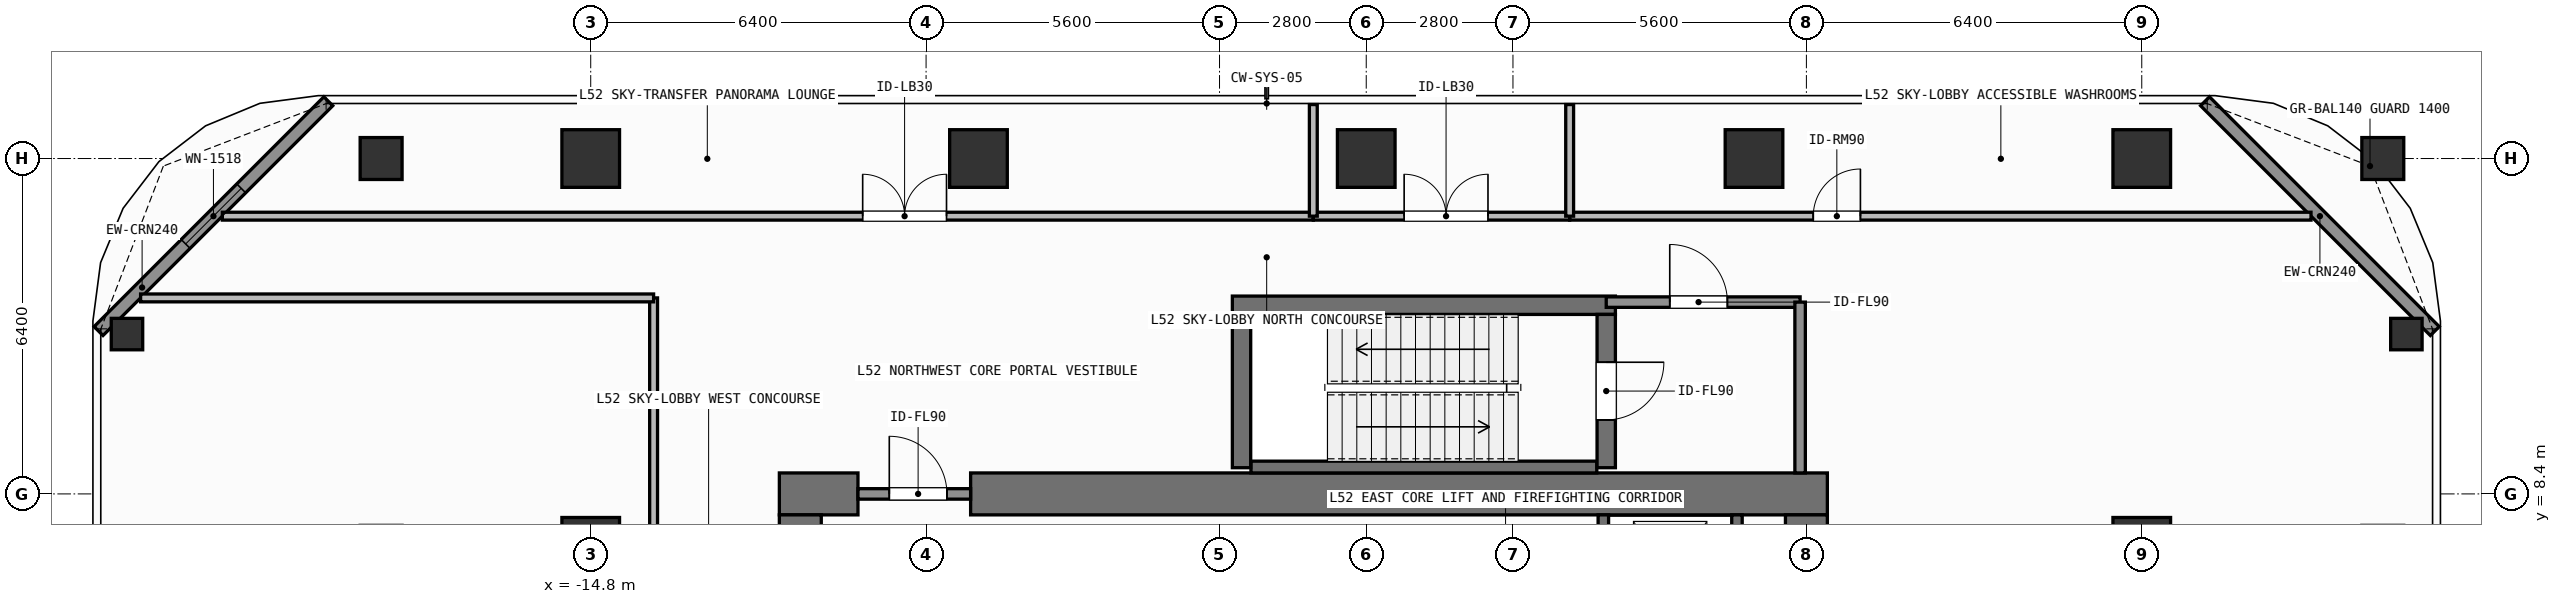
"""IFC4 building model, lengths in metres.
Left out: names, types, materials, properties, quantities, classifications, styles, units other than length and angle.
Written with IfcOpenShell. Run it as: python <this file> out.ifc"""

import sys

from ifc_helpers import new_model, si_unit, direction, frame, frame_2d, origin, origin_2d, place, context, subcontext, project, spatial, rectangle, hollow_rectangle, extrude, element, fill, save


model = new_model("IFC4")
c1 = context("Model", 3, precision=1e-05, world=origin(), true_north=direction((0.0, 1.0)))
c2 = subcontext(c1, "Body", "Model", "MODEL_VIEW")
j1 = project(units=[si_unit("LENGTHUNIT", "METRE"), si_unit("PLANEANGLEUNIT", "RADIAN")], contexts=[c1])
p1 = place(None, origin())
s1 = spatial("IfcSite", under=j1, at=p1, CompositionType="ELEMENT")
p2 = place(p1, origin())
s2 = spatial("IfcBuilding", under=s1, at=p2, CompositionType="ELEMENT")
p3 = place(p2, frame((0.0, 0.0, 210.9)))
s3 = spatial("IfcBuildingStorey", under=s2, at=p3, CompositionType="ELEMENT", Elevation=210.9)
p4 = place(p3, frame((-11.2, 8.4, 0.0), z_axis=(0.0, 0.0, 1.0), x_axis=(1.0, 0.0, 0.0)))
e1 = element("IfcWall", 1, at=p4, inside=s3, PredefinedType="SHEAR", context=c2, shape_type="SweptSolid", body=[
    extrude(rectangle(XDim=1.5, YDim=0.8, at=frame_2d((0.75, 0.0))), origin(), (0.0, 0.0, 1.0), 4.8),
])
p5 = place(p3, frame((-7.55, 8.4, 0.0), z_axis=(0.0, 0.0, 1.0), x_axis=(1.0, 0.0, 0.0)))
e2 = element("IfcWall", 2, at=p5, inside=s3, PredefinedType="SHEAR", context=c2, shape_type="SweptSolid", body=[
    extrude(rectangle(XDim=16.35, YDim=0.8, at=frame_2d((8.175, 0.0))), origin(), (0.0, 0.0, 1.0), 4.8),
])
p6 = place(p3, frame((-10.8, -8.0, 0.0), z_axis=(0.0, 0.0, 1.0), x_axis=(0.0, 1.0, 0.0)))
e3 = element("IfcWall", 3, at=p6, inside=s3, PredefinedType="SHEAR", context=c2, shape_type="SweptSolid", body=[
    extrude(rectangle(XDim=16.0, YDim=0.8, at=frame_2d((8.0, 0.0))), origin(), (0.0, 0.0, 1.0), 4.8),
])
p7 = place(p3, frame((8.4, 5.825, 0.0), z_axis=(0.0, 0.0, 1.0), x_axis=(0.0, 1.0, 0.0)))
e4 = element("IfcWall", 4, at=p7, inside=s3, PredefinedType="SHEAR", context=c2, shape_type="SweptSolid", body=[
    extrude(rectangle(XDim=2.175, YDim=0.8, at=frame_2d((1.087, 0.0))), origin(), (0.0, 0.0, 1.0), 4.8),
])
p8 = place(p3, frame((-2.555, 12.0, 0.0), z_axis=(0.0, 0.0, 1.0), x_axis=(1.0, 0.0, 0.0)))
e5 = element("IfcWall", 5, at=p8, inside=s3, PredefinedType="SHEAR", context=c2, shape_type="SweptSolid", body=[
    extrude(rectangle(XDim=7.31, YDim=0.35, at=frame_2d((3.655, 0.0))), origin(), (0.0, 0.0, 1.0), 4.8),
])
p9 = place(p3, frame((-2.2, 8.913, 0.0), z_axis=(0.0, 0.0, 1.0), x_axis=(1.0, 0.0, 0.0)))
e6 = element("IfcWall", 6, at=p9, inside=s3, PredefinedType="SHEAR", context=c2, shape_type="SweptSolid", body=[
    extrude(rectangle(XDim=6.6, YDim=0.225, at=frame_2d((3.3, 0.0))), origin(), (0.0, 0.0, 1.0), 4.8),
])
p10 = place(p3, frame((-2.38, 8.9, 0.0), z_axis=(0.0, 0.0, 1.0), x_axis=(0.0, 1.0, 0.0)))
e7 = element("IfcWall", 7, at=p10, inside=s3, PredefinedType="SHEAR", context=c2, shape_type="SweptSolid", body=[
    extrude(rectangle(XDim=2.925, YDim=0.35, at=frame_2d((1.462, 0.0))), origin(), (0.0, 0.0, 1.0), 4.8),
])
p11 = place(p3, frame((4.58, 11.825, 0.0), z_axis=(0.0, 0.0, 1.0), x_axis=(0.0, -1.0, 0.0)))
e8 = element("IfcWall", 8, at=p11, inside=s3, PredefinedType="SHEAR", context=c2, shape_type="SweptSolid", body=[
    extrude(rectangle(XDim=2.925, YDim=0.35, at=frame_2d((1.462, 0.0))), origin(), (0.0, 0.0, 1.0), 4.8),
])
p12 = place(p11, frame((0.913, 0.0, 0.0)))
e9 = element("IfcOpeningElement", 9, at=p12, cuts=e8, PredefinedType="OPENING", context=c2, shape_type="SweptSolid", body=[
    extrude(rectangle(XDim=1.1, YDim=2.15, at=frame_2d((0.55, 1.075))), frame((0.0, 0.185, 0.0), z_axis=(0.0, -1.0, 0.0), x_axis=(1.0, 0.0, 0.0)), (0.0, 0.0, 1.0), 0.37),
])
for number, where, z_axis, x_axis in (
    (10, (-14.8, 14.8, 0.0), (0.0, 0.0, 1.0), (1.0, 0.0, 0.0)),
    (11, (-7.4, 14.8, 0.0), (0.0, 0.0, 1.0), (1.0, 0.0, 0.0)),
    (12, (0.0, 14.8, 0.0), (0.0, 0.0, 1.0), (1.0, 0.0, 0.0)),
    (13, (7.4, 14.8, 0.0), (0.0, 0.0, 1.0), (1.0, 0.0, 0.0)),
    (14, (14.8, 14.8, 0.0), (0.0, 0.0, 1.0), (1.0, 0.0, 0.0)),
    (15, (-14.8, 7.4, 0.0), (0.0, 0.0, 1.0), (1.0, 0.0, 0.0)),
    (16, (14.8, 7.4, 0.0), (0.0, 0.0, 1.0), (1.0, 0.0, 0.0)),
):
    element("IfcColumn", number, at=place(p3, frame(where, z_axis=z_axis, x_axis=x_axis)), inside=s3, PredefinedType="COLUMN", context=c2, shape_type="SweptSolid", body=[
        extrude(rectangle(XDim=1.1, YDim=1.1, at=origin_2d()), origin(), (0.0, 0.0, 1.0), 4.8),
    ])
for number, where, z_axis, x_axis in (
    (17, (-18.8, 14.8, 0.0), (0.0, 0.0, 1.0), (1.0, 0.0, 0.0)),
    (18, (19.4, 14.8, 0.0), (0.0, 0.0, 1.0), (1.0, 0.0, 0.0)),
):
    element("IfcColumn", number, at=place(p3, frame(where, z_axis=z_axis, x_axis=x_axis)), inside=s3, PredefinedType="COLUMN", context=c2, shape_type="SweptSolid", body=[
        extrude(hollow_rectangle(XDim=0.8, YDim=0.8, WallThickness=0.036, at=origin_2d()), origin(), (0.0, 0.0, 1.0), 4.8),
    ])
for number, where, z_axis, x_axis in (
    (19, (-23.65, 11.45, 0.0), (0.0, 0.0, 1.0), (1.0, 0.0, 0.0)),
    (20, (19.85, 11.45, 0.0), (0.0, 0.0, 1.0), (1.0, 0.0, 0.0)),
):
    element("IfcColumn", number, at=place(p3, frame(where, z_axis=z_axis, x_axis=x_axis)), inside=s3, PredefinedType="COLUMN", context=c2, shape_type="SweptSolid", body=[
        extrude(hollow_rectangle(XDim=0.6, YDim=0.6, WallThickness=0.028, at=origin_2d()), origin(), (0.0, 0.0, 1.0), 4.8),
    ])
p13 = place(p3, frame((-24.192, 11.508, 0.0), z_axis=(0.0, 0.0, 1.0), x_axis=(0.707106781187, 0.707106781187, 0.0)))
e21 = element("IfcWall", 21, at=p13, inside=s3, PredefinedType="SOLIDWALL", context=c2, shape_type="SweptSolid", body=[
    extrude(rectangle(XDim=6.201, YDim=0.24, at=frame_2d((3.101, 0.0))), origin(), (0.0, 0.0, 1.0), 4.58),
])
p14 = place(p13, frame((2.351, 0.0, 0.8)))
e22 = element("IfcOpeningElement", 22, at=p14, cuts=e21, PredefinedType="OPENING", context=c2, shape_type="SweptSolid", body=[
    extrude(rectangle(XDim=1.5, YDim=1.85, at=frame_2d((0.75, 0.925))), frame((0.0, 0.13, 0.0), z_axis=(0.0, -1.0, 0.0), x_axis=(1.0, 0.0, 0.0)), (0.0, 0.0, 1.0), 0.26),
])
p15 = place(p3, frame((16.008, 15.892, 0.0), z_axis=(0.0, 0.0, 1.0), x_axis=(0.707106781187, -0.707106781187, 0.0)))
e23 = element("IfcWall", 23, at=p15, inside=s3, PredefinedType="SOLIDWALL", context=c2, shape_type="SweptSolid", body=[
    extrude(rectangle(XDim=6.201, YDim=0.24, at=frame_2d((3.101, 0.0))), origin(), (0.0, 0.0, 1.0), 4.58),
])
p16 = place(p3, frame((4.525, 5.825, 0.0), z_axis=(0.0, 0.0, 1.0), x_axis=(0.0, 1.0, 0.0)))
e24 = element("IfcWall", 24, at=p16, inside=s3, PredefinedType="SHEAR", context=c2, shape_type="SweptSolid", body=[
    extrude(rectangle(XDim=2.175, YDim=0.2, at=frame_2d((1.087, 0.0))), origin(), (0.0, 0.0, 1.0), 4.58),
])
p17 = place(p16, frame((0.425, 0.0, 0.0)))
e25 = element("IfcOpeningElement", 25, at=p17, cuts=e24, PredefinedType="OPENING", context=c2, shape_type="SweptSolid", body=[
    extrude(rectangle(XDim=1.1, YDim=2.2, at=frame_2d((0.55, 1.1))), frame((0.0, 0.11, 0.0), z_axis=(0.0, -1.0, 0.0), x_axis=(1.0, 0.0, 0.0)), (0.0, 0.0, 1.0), 0.22),
])
p18 = place(p3, frame((7.075, 5.825, 0.0), z_axis=(0.0, 0.0, 1.0), x_axis=(0.0, 1.0, 0.0)))
e26 = element("IfcWall", 26, at=p18, inside=s3, PredefinedType="SHEAR", context=c2, shape_type="SweptSolid", body=[
    extrude(rectangle(XDim=2.175, YDim=0.2, at=frame_2d((1.087, 0.0))), origin(), (0.0, 0.0, 1.0), 4.58),
])
p19 = place(p3, frame((4.58, 12.06, 0.0), z_axis=(0.0, 0.0, 1.0), x_axis=(1.0, 0.0, 0.0)))
e27 = element("IfcWall", 27, at=p19, inside=s3, PredefinedType="SOLIDWALL", context=c2, shape_type="SweptSolid", body=[
    extrude(rectangle(XDim=3.7, YDim=0.2, at=frame_2d((1.85, 0.0))), origin(), (0.0, 0.0, 1.0), 4.58),
])
p20 = place(p19, frame((1.212, 0.0, 0.0)))
e28 = element("IfcOpeningElement", 28, at=p20, cuts=e27, PredefinedType="OPENING", context=c2, shape_type="SweptSolid", body=[
    extrude(rectangle(XDim=1.1, YDim=2.15, at=frame_2d((0.55, 1.075))), frame((0.0, 0.11, 0.0), z_axis=(0.0, -1.0, 0.0), x_axis=(1.0, 0.0, 0.0)), (0.0, 0.0, 1.0), 0.22),
])
p21 = place(p3, frame((-9.7, 8.4, 0.0), z_axis=(0.0, 0.0, 1.0), x_axis=(1.0, 0.0, 0.0)))
e29 = element("IfcWall", 29, at=p21, inside=s3, PredefinedType="SOLIDWALL", context=c2, shape_type="SweptSolid", body=[
    extrude(rectangle(XDim=2.15, YDim=0.2, at=frame_2d((1.075, 0.0))), origin(), (0.0, 0.0, 1.0), 3.72),
])
p22 = place(p21, frame((0.598, 0.0, 0.0)))
e30 = element("IfcOpeningElement", 30, at=p22, cuts=e29, PredefinedType="OPENING", context=c2, shape_type="SweptSolid", body=[
    extrude(rectangle(XDim=1.1, YDim=2.15, at=frame_2d((0.55, 1.075))), frame((0.0, 0.11, 0.0), z_axis=(0.0, -1.0, 0.0), x_axis=(1.0, 0.0, 0.0)), (0.0, 0.0, 1.0), 0.22),
])
p23 = place(p3, frame((-21.83, 13.7, 0.0), z_axis=(0.0, 0.0, 1.0), x_axis=(1.0, 0.0, 0.0)))
e31 = element("IfcWall", 31, at=p23, inside=s3, PredefinedType="PARTITIONING", context=c2, shape_type="SweptSolid", body=[
    extrude(rectangle(XDim=20.82, YDim=0.15, at=frame_2d((10.41, 0.0))), origin(), (0.0, 0.0, 1.0), 4.58),
])
p24 = place(p23, frame((12.22, 0.0, 0.0)))
e32 = element("IfcOpeningElement", 32, at=p24, cuts=e31, PredefinedType="OPENING", context=c2, shape_type="SweptSolid", body=[
    extrude(rectangle(XDim=1.6, YDim=2.3, at=frame_2d((0.8, 1.15))), frame((0.0, 0.085, 0.0), z_axis=(0.0, -1.0, 0.0), x_axis=(1.0, 0.0, 0.0)), (0.0, 0.0, 1.0), 0.17),
])
p25 = place(p3, frame((-1.01, 13.7, 0.0), z_axis=(0.0, 0.0, 1.0), x_axis=(1.0, 0.0, 0.0)))
e33 = element("IfcWall", 33, at=p25, inside=s3, PredefinedType="PARTITIONING", context=c2, shape_type="SweptSolid", body=[
    extrude(rectangle(XDim=4.892, YDim=0.15, at=frame_2d((2.446, 0.0))), origin(), (0.0, 0.0, 1.0), 4.58),
])
p26 = place(p25, frame((1.733, 0.0, 0.0)))
e34 = element("IfcOpeningElement", 34, at=p26, cuts=e33, PredefinedType="OPENING", context=c2, shape_type="SweptSolid", body=[
    extrude(rectangle(XDim=1.6, YDim=2.3, at=frame_2d((0.8, 1.15))), frame((0.0, 0.085, 0.0), z_axis=(0.0, -1.0, 0.0), x_axis=(1.0, 0.0, 0.0)), (0.0, 0.0, 1.0), 0.17),
])
p27 = place(p3, frame((3.882, 13.7, 0.0), z_axis=(0.0, 0.0, 1.0), x_axis=(1.0, 0.0, 0.0)))
e35 = element("IfcWall", 35, at=p27, inside=s3, PredefinedType="PARTITIONING", context=c2, shape_type="SweptSolid", body=[
    extrude(rectangle(XDim=14.148, YDim=0.15, at=frame_2d((7.074, 0.0))), origin(), (0.0, 0.0, 1.0), 4.58),
])
p28 = place(p27, frame((4.649, 0.0, 0.0)))
e36 = element("IfcOpeningElement", 36, at=p28, cuts=e35, PredefinedType="OPENING", context=c2, shape_type="SweptSolid", body=[
    extrude(rectangle(XDim=0.9, YDim=2.1, at=frame_2d((0.45, 1.05))), frame((0.0, 0.085, 0.0), z_axis=(0.0, -1.0, 0.0), x_axis=(1.0, 0.0, 0.0)), (0.0, 0.0, 1.0), 0.17),
])
p29 = place(p3, frame((-13.6, -12.14, 0.0), z_axis=(0.0, 0.0, 1.0), x_axis=(0.0, 1.0, 0.0)))
e37 = element("IfcWall", 37, at=p29, inside=s3, PredefinedType="PARTITIONING", context=c2, shape_type="SweptSolid", body=[
    extrude(rectangle(XDim=24.28, YDim=0.15, at=frame_2d((12.14, 0.0))), origin(), (0.0, 0.0, 1.0), 4.58),
])
p30 = place(p29, frame((11.25, 0.0, 0.0)))
e38 = element("IfcOpeningElement", 38, at=p30, cuts=e37, PredefinedType="OPENING", context=c2, shape_type="SweptSolid", body=[
    extrude(rectangle(XDim=1.6, YDim=2.3, at=frame_2d((0.8, 1.15))), frame((0.0, 0.085, 0.0), z_axis=(0.0, -1.0, 0.0), x_axis=(1.0, 0.0, 0.0)), (0.0, 0.0, 1.0), 0.17),
])
p31 = place(p3, frame((8.28, 8.8, 0.0), z_axis=(0.0, 0.0, 1.0), x_axis=(0.0, 1.0, 0.0)))
e39 = element("IfcWall", 39, at=p31, inside=s3, PredefinedType="SOLIDWALL", context=c2, shape_type="SweptSolid", body=[
    extrude(rectangle(XDim=3.26, YDim=0.2, at=frame_2d((1.63, 0.0))), origin(), (0.0, 0.0, 1.0), 4.58),
])
for number, where, z_axis, x_axis in (
    (40, (-1.01, 13.7, 0.0), (0.0, 0.0, 1.0), (0.0, 1.0, 0.0)),
    (41, (3.882, 13.7, 0.0), (0.0, 0.0, 1.0), (0.0, 1.0, 0.0)),
):
    element("IfcWall", number, at=place(p3, frame(where, z_axis=z_axis, x_axis=x_axis)), inside=s3, PredefinedType="PARTITIONING", context=c2, shape_type="SweptSolid", body=[
        extrude(rectangle(XDim=2.13, YDim=0.15, at=frame_2d((1.065, 0.0))), origin(), (0.0, 0.0, 1.0), 4.58),
    ])
p32 = place(p3, frame((-23.39, 12.14, 0.0), z_axis=(0.0, 0.0, 1.0), x_axis=(1.0, 0.0, 0.0)))
e42 = element("IfcWall", 42, at=p32, inside=s3, PredefinedType="PARTITIONING", context=c2, shape_type="SweptSolid", body=[
    extrude(rectangle(XDim=9.79, YDim=0.15, at=frame_2d((4.895, 0.0))), origin(), (0.0, 0.0, 1.0), 4.58),
])
p33 = place(p14, origin())
e43 = element("IfcWindow", 43, at=p33, inside=s3, PartitioningType="SINGLE_PANEL", PredefinedType="WINDOW", context=c2, shape_type="SweptSolid", body=[
    extrude(rectangle(XDim=1.5, YDim=1.85, at=frame_2d((0.75, 0.925))), frame((0.0, 0.03, 0.0), z_axis=(0.0, -1.0, 0.0), x_axis=(1.0, 0.0, 0.0)), (0.0, 0.0, 1.0), 0.06),
])
fill(e22, e43)
p34 = place(p12, origin())
e44 = element("IfcDoor", 44, at=p34, inside=s3, OperationType="SINGLE_SWING_LEFT", PredefinedType="DOOR", context=c2, shape_type="SweptSolid", body=[
    extrude(rectangle(XDim=1.1, YDim=2.15, at=frame_2d((0.55, 1.075))), frame((0.0, 0.025, 0.0), z_axis=(0.0, -1.0, 0.0), x_axis=(1.0, 0.0, 0.0)), (0.0, 0.0, 1.0), 0.05),
])
fill(e9, e44)
p35 = place(p20, origin())
e45 = element("IfcDoor", 45, at=p35, inside=s3, OperationType="SINGLE_SWING_LEFT", PredefinedType="DOOR", context=c2, shape_type="SweptSolid", body=[
    extrude(rectangle(XDim=1.1, YDim=2.15, at=frame_2d((0.55, 1.075))), frame((0.0, 0.025, 0.0), z_axis=(0.0, -1.0, 0.0), x_axis=(1.0, 0.0, 0.0)), (0.0, 0.0, 1.0), 0.05),
])
fill(e28, e45)
p36 = place(p22, origin())
e46 = element("IfcDoor", 46, at=p36, inside=s3, OperationType="SINGLE_SWING_LEFT", PredefinedType="DOOR", context=c2, shape_type="SweptSolid", body=[
    extrude(rectangle(XDim=1.1, YDim=2.15, at=frame_2d((0.55, 1.075))), frame((0.0, 0.025, 0.0), z_axis=(0.0, -1.0, 0.0), x_axis=(1.0, 0.0, 0.0)), (0.0, 0.0, 1.0), 0.05),
])
fill(e30, e46)
p37 = place(p24, origin())
e47 = element("IfcDoor", 47, at=p37, inside=s3, OperationType="SINGLE_SWING_LEFT", PredefinedType="DOOR", context=c2, shape_type="SweptSolid", body=[
    extrude(rectangle(XDim=1.6, YDim=2.3, at=frame_2d((0.8, 1.15))), frame((0.0, 0.025, 0.0), z_axis=(0.0, -1.0, 0.0), x_axis=(1.0, 0.0, 0.0)), (0.0, 0.0, 1.0), 0.05),
])
fill(e32, e47)
p38 = place(p26, origin())
e48 = element("IfcDoor", 48, at=p38, inside=s3, OperationType="SINGLE_SWING_LEFT", PredefinedType="DOOR", context=c2, shape_type="SweptSolid", body=[
    extrude(rectangle(XDim=1.6, YDim=2.3, at=frame_2d((0.8, 1.15))), frame((0.0, 0.025, 0.0), z_axis=(0.0, -1.0, 0.0), x_axis=(1.0, 0.0, 0.0)), (0.0, 0.0, 1.0), 0.05),
])
fill(e34, e48)
p39 = place(p28, origin())
e49 = element("IfcDoor", 49, at=p39, inside=s3, OperationType="SINGLE_SWING_RIGHT", PredefinedType="DOOR", context=c2, shape_type="SweptSolid", body=[
    extrude(rectangle(XDim=0.9, YDim=2.1, at=frame_2d((0.45, 1.05))), frame((0.0, 0.025, 0.0), z_axis=(0.0, -1.0, 0.0), x_axis=(1.0, 0.0, 0.0)), (0.0, 0.0, 1.0), 0.05),
])
fill(e36, e49)
save(model, sys.argv[1])
